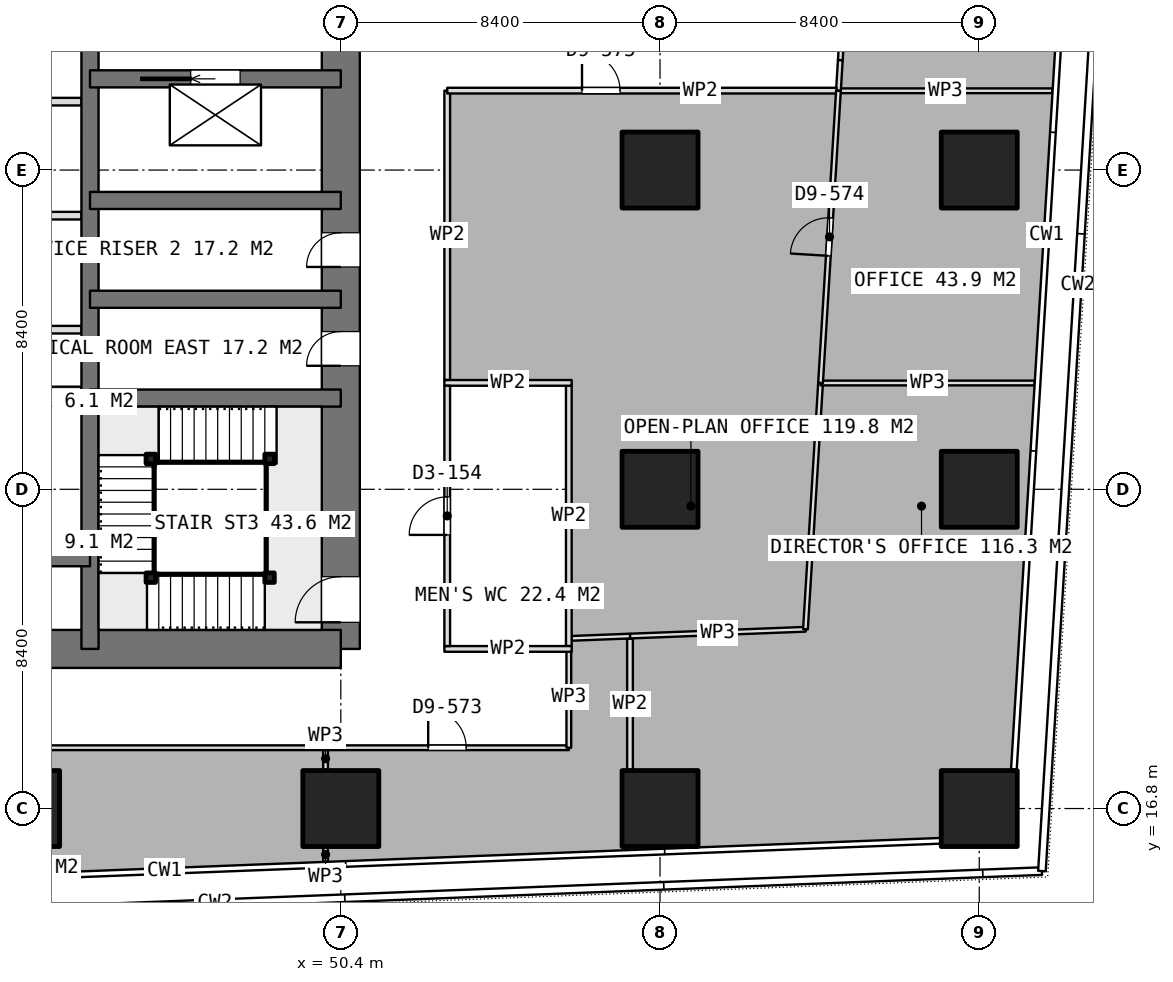
"""IFC4 building model, lengths in metres.
Left out: names, types, materials, properties, quantities, classifications, styles, units other than length and angle.
Written with IfcOpenShell. Run it as: python <this file> out.ifc"""

import sys

from ifc_helpers import new_model, si_unit, direction, frame, frame_2d, origin, origin_2d, place, context, subcontext, project, spatial, rectangle, extrude, element, fill, save


model = new_model("IFC4")
c1 = context("Model", 3, precision=1e-05, world=origin(), true_north=direction((0.0, 1.0)))
c2 = subcontext(c1, "Body", "Model", "MODEL_VIEW")
j1 = project(units=[si_unit("LENGTHUNIT", "METRE"), si_unit("PLANEANGLEUNIT", "RADIAN")], contexts=[c1])
p1 = place(None, origin())
s1 = spatial("IfcSite", under=j1, at=p1, CompositionType="ELEMENT")
p2 = place(p1, origin())
s2 = spatial("IfcBuilding", under=s1, at=p2, CompositionType="ELEMENT")
p3 = place(p2, frame((0.0, 0.0, 144.05)))
s3 = spatial("IfcBuildingStorey", under=s2, at=p3, CompositionType="ELEMENT", Elevation=144.05)
p4 = place(p3, frame((40.0, 21.0, 0.0), z_axis=(0.0, 0.0, 1.0), x_axis=(1.0, 0.0, 0.0)))
e1 = element("IfcWall", 1, at=p4, inside=s3, PredefinedType="SHEAR", context=c2, shape_type="SweptSolid", body=[
    extrude(rectangle(XDim=10.4, YDim=1.0, at=frame_2d((5.2, 0.0))), origin(), (0.0, 0.0, 1.0), 3.75),
])
p5 = place(p3, frame((50.4, 21.0, 0.0), z_axis=(0.0, 0.0, 1.0), x_axis=(0.0, 1.0, 0.0)))
e2 = element("IfcWall", 2, at=p5, inside=s3, PredefinedType="SHEAR", context=c2, shape_type="SweptSolid", body=[
    extrude(rectangle(XDim=25.2, YDim=1.0, at=frame_2d((12.6, 0.0))), origin(), (0.0, 0.0, 1.0), 3.75),
])
p6 = place(p5, frame((16.2, 0.0, 0.0)))
e3 = element("IfcOpeningElement", 3, at=p6, cuts=e2, PredefinedType="OPENING", context=c2, shape_type="SweptSolid", body=[
    extrude(rectangle(XDim=1.2, YDim=2.1, at=frame_2d((0.6, 1.05))), frame((0.0, 0.51, 0.0), z_axis=(0.0, -1.0, 0.0), x_axis=(1.0, 0.0, 0.0)), (0.0, 0.0, 1.0), 1.02),
])
p7 = place(p5, frame((10.05, 0.0, 0.0)))
e4 = element("IfcOpeningElement", 4, at=p7, cuts=e2, PredefinedType="OPENING", context=c2, shape_type="SweptSolid", body=[
    extrude(rectangle(XDim=0.9, YDim=2.1, at=frame_2d((0.45, 1.05))), frame((0.0, 0.51, 0.0), z_axis=(0.0, -1.0, 0.0), x_axis=(1.0, 0.0, 0.0)), (0.0, 0.0, 1.0), 1.02),
])
p8 = place(p5, frame((7.45, 0.0, 0.0)))
e5 = element("IfcOpeningElement", 5, at=p8, cuts=e2, PredefinedType="OPENING", context=c2, shape_type="SweptSolid", body=[
    extrude(rectangle(XDim=0.9, YDim=2.1, at=frame_2d((0.45, 1.05))), frame((0.0, 0.51, 0.0), z_axis=(0.0, -1.0, 0.0), x_axis=(1.0, 0.0, 0.0)), (0.0, 0.0, 1.0), 1.02),
])
p9 = place(p5, frame((0.7, 0.0, 0.0)))
e6 = element("IfcOpeningElement", 6, at=p9, cuts=e2, PredefinedType="OPENING", context=c2, shape_type="SweptSolid", body=[
    extrude(rectangle(XDim=1.2, YDim=2.1, at=frame_2d((0.6, 1.05))), frame((0.0, 0.51, 0.0), z_axis=(0.0, -1.0, 0.0), x_axis=(1.0, 0.0, 0.0)), (0.0, 0.0, 1.0), 1.02),
])
p10 = place(p3, frame((43.8, 21.0, 0.0), z_axis=(0.0, 0.0, 1.0), x_axis=(0.0, 1.0, 0.0)))
e7 = element("IfcWall", 7, at=p10, inside=s3, PredefinedType="SHEAR", context=c2, shape_type="SweptSolid", body=[
    extrude(rectangle(XDim=25.2, YDim=0.45, at=frame_2d((12.6, 0.0))), origin(), (0.0, 0.0, 1.0), 3.75),
])
p11 = place(p3, frame((40.0, 23.4, 0.0), z_axis=(0.0, 0.0, 1.0), x_axis=(1.0, 0.0, 0.0)))
e8 = element("IfcWall", 8, at=p11, inside=s3, PredefinedType="SHEAR", context=c2, shape_type="SweptSolid", body=[
    extrude(rectangle(XDim=3.8, YDim=0.45, at=frame_2d((1.9, 0.0))), origin(), (0.0, 0.0, 1.0), 3.75),
])
for number, where, z_axis, x_axis in (
    (9, (43.8, 27.6, 0.0), (0.0, 0.0, 1.0), (1.0, 0.0, 0.0)),
    (10, (43.8, 30.2, 0.0), (0.0, 0.0, 1.0), (1.0, 0.0, 0.0)),
    (11, (43.8, 32.8, 0.0), (0.0, 0.0, 1.0), (1.0, 0.0, 0.0)),
):
    element("IfcWall", number, at=place(p3, frame(where, z_axis=z_axis, x_axis=x_axis)), inside=s3, PredefinedType="SHEAR", context=c2, shape_type="SweptSolid", body=[
        extrude(rectangle(XDim=6.6, YDim=0.45, at=frame_2d((3.3, 0.0))), origin(), (0.0, 0.0, 1.0), 3.75),
    ])
p12 = place(p3, frame((43.8, 36.0, 0.0), z_axis=(0.0, 0.0, 1.0), x_axis=(1.0, 0.0, 0.0)))
e12 = element("IfcWall", 12, at=p12, inside=s3, PredefinedType="SHEAR", context=c2, shape_type="SweptSolid", body=[
    extrude(rectangle(XDim=6.6, YDim=0.45, at=frame_2d((3.3, 0.0))), origin(), (0.0, 0.0, 1.0), 3.75),
])
p13 = place(p12, frame((2.65, 0.0, 0.0)))
e13 = element("IfcOpeningElement", 13, at=p13, cuts=e12, PredefinedType="OPENING", context=c2, shape_type="SweptSolid", body=[
    extrude(rectangle(XDim=1.3, YDim=2.1, at=frame_2d((0.65, 1.05))), frame((0.0, 0.235, 0.0), z_axis=(0.0, -1.0, 0.0), x_axis=(1.0, 0.0, 0.0)), (0.0, 0.0, 1.0), 0.47),
])
for number, where, z_axis, x_axis in (
    (14, (42.0, 16.8, 0.0), (0.0, 0.0, 1.0), (1.0, 0.0, 0.0)),
    (15, (50.4, 16.8, 0.0), (0.0, 0.0, 1.0), (1.0, 0.0, 0.0)),
    (16, (58.8, 16.8, 0.0), (0.0, 0.0, 1.0), (1.0, 0.0, 0.0)),
    (17, (58.8, 25.2, 0.0), (0.0, 0.0, 1.0), (1.0, 0.0, 0.0)),
    (18, (58.8, 33.6, 0.0), (0.0, 0.0, 1.0), (1.0, 0.0, 0.0)),
    (19, (67.2, 16.8, 0.0), (0.0, 0.0, 1.0), (1.0, 0.0, 0.0)),
    (20, (67.2, 25.2, 0.0), (0.0, 0.0, 1.0), (1.0, 0.0, 0.0)),
    (21, (67.2, 33.6, 0.0), (0.0, 0.0, 1.0), (1.0, 0.0, 0.0)),
):
    element("IfcColumn", number, at=place(p3, frame(where, z_axis=z_axis, x_axis=x_axis)), inside=s3, PredefinedType="COLUMN", context=c2, shape_type="SweptSolid", body=[
        extrude(rectangle(XDim=2.0, YDim=2.0, at=origin_2d()), origin(), (0.0, 0.0, 1.0), 3.75),
    ])
for number, where, z_axis, x_axis in (
    (22, (40.225, 29.4, 0.0), (0.0, 0.0, 1.0), (1.0, 0.0, 0.0)),
    (23, (40.225, 32.4, 0.0), (0.0, 0.0, 1.0), (1.0, 0.0, 0.0)),
    (24, (40.225, 35.4, 0.0), (0.0, 0.0, 1.0), (1.0, 0.0, 0.0)),
    (25, (40.225, 27.8, 0.0), (0.0, 0.0, 1.0), (1.0, 0.0, 0.0)),
):
    element("IfcWall", number, at=place(p3, frame(where, z_axis=z_axis, x_axis=x_axis)), inside=s3, PredefinedType="PARTITIONING", context=c2, shape_type="SweptSolid", body=[
        extrude(rectangle(XDim=3.35, YDim=0.2, at=frame_2d((1.675, 0.0))), origin(), (0.0, 0.0, 1.0), 3.5),
    ])
for number, where, z_axis, x_axis in (
    (26, (53.125, 21.0, 0.0), (0.0, 0.0, 1.0), (1.0, 0.0, 0.0)),
    (27, (53.125, 28.0, 0.0), (0.0, 0.0, 1.0), (1.0, 0.0, 0.0)),
):
    element("IfcWall", number, at=place(p3, frame(where, z_axis=z_axis, x_axis=x_axis)), inside=s3, PredefinedType="PARTITIONING", context=c2, shape_type="SweptSolid", body=[
        extrude(rectangle(XDim=3.35, YDim=0.15, at=frame_2d((1.675, 0.0))), origin(), (0.0, 0.0, 1.0), 3.5),
    ])
p14 = place(p3, frame((53.2, 21.075, 0.0), z_axis=(0.0, 0.0, 1.0), x_axis=(0.0, 1.0, 0.0)))
e28 = element("IfcWall", 28, at=p14, inside=s3, PredefinedType="PARTITIONING", context=c2, shape_type="SweptSolid", body=[
    extrude(rectangle(XDim=6.85, YDim=0.15, at=frame_2d((3.425, 0.0))), origin(), (0.0, 0.0, 1.0), 3.5),
])
p15 = place(p14, frame((2.925, 0.0, 0.0)))
e29 = element("IfcOpeningElement", 29, at=p15, cuts=e28, PredefinedType="OPENING", context=c2, shape_type="SweptSolid", body=[
    extrude(rectangle(XDim=1.0, YDim=2.1, at=frame_2d((0.5, 1.05))), frame((0.0, 0.085, 0.0), z_axis=(0.0, -1.0, 0.0), x_axis=(1.0, 0.0, 0.0)), (0.0, 0.0, 1.0), 0.17),
])
p16 = place(p3, frame((56.4, 21.075, 0.0), z_axis=(0.0, 0.0, 1.0), x_axis=(0.0, 1.0, 0.0)))
e30 = element("IfcWall", 30, at=p16, inside=s3, PredefinedType="PARTITIONING", context=c2, shape_type="SweptSolid", body=[
    extrude(rectangle(XDim=6.85, YDim=0.15, at=frame_2d((3.425, 0.0))), origin(), (0.0, 0.0, 1.0), 3.5),
])
p17 = place(p3, frame((49.999, 15.401, 0.0), z_axis=(0.0, 0.0, 1.0), x_axis=(0.0, 1.0, 0.0)))
e31 = element("IfcWall", 31, at=p17, inside=s3, PredefinedType="PARTITIONING", context=c2, shape_type="SweptSolid", body=[
    extrude(rectangle(XDim=0.379, YDim=0.125, at=frame_2d((0.189, 0.0))), origin(), (0.0, 0.0, 1.0), 3.5),
])
p18 = place(p3, frame((49.999, 17.82, 0.0), z_axis=(0.0, 0.0, 1.0), x_axis=(0.0, 1.0, 0.0)))
e32 = element("IfcWall", 32, at=p18, inside=s3, PredefinedType="PARTITIONING", context=c2, shape_type="SweptSolid", body=[
    extrude(rectangle(XDim=0.58, YDim=0.125, at=frame_2d((0.29, 0.0))), origin(), (0.0, 0.0, 1.0), 3.5),
])
p19 = place(p3, frame((49.999, 18.4, 0.0), z_axis=(0.0, 0.0, 1.0), x_axis=(1.0, 0.0, 0.0)))
e33 = element("IfcWall", 33, at=p19, inside=s3, PredefinedType="PARTITIONING", context=c2, shape_type="SweptSolid", body=[
    extrude(rectangle(XDim=6.401, YDim=0.125, at=frame_2d((3.2, 0.0))), origin(), (0.0, 0.0, 1.0), 3.5),
])
p20 = place(p19, frame((2.7, 0.0, 0.0)))
e34 = element("IfcOpeningElement", 34, at=p20, cuts=e33, PredefinedType="OPENING", context=c2, shape_type="SweptSolid", body=[
    extrude(rectangle(XDim=1.0, YDim=2.1, at=frame_2d((0.5, 1.05))), frame((0.0, 0.073, 0.0), z_axis=(0.0, -1.0, 0.0), x_axis=(1.0, 0.0, 0.0)), (0.0, 0.0, 1.0), 0.145),
])
p21 = place(p3, frame((56.4, 18.4, 0.0), z_axis=(0.0, 0.0, 1.0), x_axis=(0.0, 1.0, 0.0)))
e35 = element("IfcWall", 35, at=p21, inside=s3, PredefinedType="PARTITIONING", context=c2, shape_type="SweptSolid", body=[
    extrude(rectangle(XDim=2.674, YDim=0.125, at=frame_2d((1.337, 0.0))), origin(), (0.0, 0.0, 1.0), 3.5),
])
p22 = place(p3, frame((56.475, 21.278, 0.0), z_axis=(0.0, 0.0, 1.0), x_axis=(0.999243484795, 0.038890334198, 0.0)))
e36 = element("IfcWall", 36, at=p22, inside=s3, PredefinedType="PARTITIONING", context=c2, shape_type="SweptSolid", body=[
    extrude(rectangle(XDim=1.538, YDim=0.125, at=frame_2d((0.769, 0.0))), origin(), (0.0, 0.0, 1.0), 3.5),
])
p23 = place(p3, frame((58.012, 21.338, 0.0), z_axis=(0.0, 0.0, 1.0), x_axis=(0.999246974146, 0.038800575518, 0.0)))
e37 = element("IfcWall", 37, at=p23, inside=s3, PredefinedType="PARTITIONING", context=c2, shape_type="SweptSolid", body=[
    extrude(rectangle(XDim=4.618, YDim=0.125, at=frame_2d((2.309, 0.0))), origin(), (0.0, 0.0, 1.0), 3.5),
])
p24 = place(p3, frame((62.627, 21.517, 0.0), z_axis=(0.0, 0.0, 1.0), x_axis=(0.061146763842, 0.998128785915, 0.0)))
e38 = element("IfcWall", 38, at=p24, inside=s3, PredefinedType="PARTITIONING", context=c2, shape_type="SweptSolid", body=[
    extrude(rectangle(XDim=6.492, YDim=0.125, at=frame_2d((3.246, 0.0))), origin(), (0.0, 0.0, 1.0), 3.5),
])
p25 = place(p3, frame((63.024, 27.997, 0.0), z_axis=(0.0, 0.0, 1.0), x_axis=(1.0, 0.0, 0.0)))
e39 = element("IfcWall", 39, at=p25, inside=s3, PredefinedType="PARTITIONING", context=c2, shape_type="SweptSolid", body=[
    extrude(rectangle(XDim=5.631, YDim=0.125, at=frame_2d((2.815, 0.0))), origin(), (0.0, 0.0, 1.0), 3.5),
])
p26 = place(p3, frame((63.024, 27.998, 0.0), z_axis=(0.0, 0.0, 1.0), x_axis=(0.061174508596, 0.998127085845, 0.0)))
e40 = element("IfcWall", 40, at=p26, inside=s3, PredefinedType="PARTITIONING", context=c2, shape_type="SweptSolid", body=[
    extrude(rectangle(XDim=7.702, YDim=0.125, at=frame_2d((3.851, 0.0))), origin(), (0.0, 0.0, 1.0), 3.5),
])
p27 = place(p26, frame((3.351, 0.0, 0.0)))
e41 = element("IfcOpeningElement", 41, at=p27, cuts=e40, PredefinedType="OPENING", context=c2, shape_type="SweptSolid", body=[
    extrude(rectangle(XDim=1.0, YDim=2.1, at=frame_2d((0.5, 1.05))), frame((0.0, 0.073, 0.0), z_axis=(0.0, -1.0, 0.0), x_axis=(1.0, 0.0, 0.0)), (0.0, 0.0, 1.0), 0.145),
])
p28 = place(p3, frame((63.495, 35.686, 0.0), z_axis=(0.0, 0.0, 1.0), x_axis=(1.0, 0.0, 0.0)))
e42 = element("IfcWall", 42, at=p28, inside=s3, PredefinedType="PARTITIONING", context=c2, shape_type="SweptSolid", body=[
    extrude(rectangle(XDim=5.631, YDim=0.125, at=frame_2d((2.815, 0.0))), origin(), (0.0, 0.0, 1.0), 3.5),
])
p29 = place(p3, frame((63.544, 36.491, 0.0), z_axis=(0.0, 0.0, 1.0), x_axis=(0.061169286548, 0.998127405887, 0.0)))
e43 = element("IfcWall", 43, at=p29, inside=s3, PredefinedType="PARTITIONING", context=c2, shape_type="SweptSolid", body=[
    extrude(rectangle(XDim=9.303, YDim=0.125, at=frame_2d((4.652, 0.0))), origin(), (0.0, 0.0, 1.0), 3.5),
])
p30 = place(p29, frame((4.152, 0.0, 0.0)))
e44 = element("IfcOpeningElement", 44, at=p30, cuts=e43, PredefinedType="OPENING", context=c2, shape_type="SweptSolid", body=[
    extrude(rectangle(XDim=1.0, YDim=2.1, at=frame_2d((0.5, 1.05))), frame((0.0, 0.073, 0.0), z_axis=(0.0, -1.0, 0.0), x_axis=(1.0, 0.0, 0.0)), (0.0, 0.0, 1.0), 0.145),
])
p31 = place(p3, frame((63.495, 35.687, 0.0), z_axis=(0.0, 0.0, 1.0), x_axis=(0.060623183924, 0.998160723316, 0.0)))
e45 = element("IfcWall", 45, at=p31, inside=s3, PredefinedType="PARTITIONING", context=c2, shape_type="SweptSolid", body=[
    extrude(rectangle(XDim=0.805, YDim=0.125, at=frame_2d((0.403, 0.0))), origin(), (0.0, 0.0, 1.0), 3.5),
])
p32 = place(p3, frame((58.01, 17.82, 0.0), z_axis=(0.0, 0.0, 1.0), x_axis=(0.0, 1.0, 0.0)))
e46 = element("IfcWall", 46, at=p32, inside=s3, PredefinedType="PARTITIONING", context=c2, shape_type="SweptSolid", body=[
    extrude(rectangle(XDim=3.455, YDim=0.15, at=frame_2d((1.728, 0.0))), origin(), (0.0, 0.0, 1.0), 3.5),
])
p33 = place(p3, frame((53.2, 28.075, 0.0), z_axis=(0.0, 0.0, 1.0), x_axis=(0.0, 1.0, 0.0)))
e47 = element("IfcWall", 47, at=p33, inside=s3, PredefinedType="PARTITIONING", context=c2, shape_type="SweptSolid", body=[
    extrude(rectangle(XDim=7.615, YDim=0.15, at=frame_2d((3.808, 0.0))), origin(), (0.0, 0.0, 1.0), 3.5),
])
p34 = place(p3, frame((53.2, 35.69, 0.0), z_axis=(0.0, 0.0, 1.0), x_axis=(1.0, 0.0, 0.0)))
e48 = element("IfcWall", 48, at=p34, inside=s3, PredefinedType="PARTITIONING", context=c2, shape_type="SweptSolid", body=[
    extrude(rectangle(XDim=10.246, YDim=0.15, at=frame_2d((5.123, 0.0))), origin(), (0.0, 0.0, 1.0), 3.5),
])
p35 = place(p34, frame((3.547, 0.0, 0.0)))
e49 = element("IfcOpeningElement", 49, at=p35, cuts=e48, PredefinedType="OPENING", context=c2, shape_type="SweptSolid", body=[
    extrude(rectangle(XDim=1.0, YDim=2.1, at=frame_2d((0.5, 1.05))), frame((0.0, 0.085, 0.0), z_axis=(0.0, -1.0, 0.0), x_axis=(1.0, 0.0, 0.0)), (0.0, 0.0, 1.0), 0.17),
])
p36 = place(p3, frame((33.513, 18.4, 0.0), z_axis=(0.0, 0.0, 1.0), x_axis=(1.0, 0.0, 0.0)))
e50 = element("IfcWall", 50, at=p36, inside=s3, PredefinedType="PARTITIONING", context=c2, shape_type="SweptSolid", body=[
    extrude(rectangle(XDim=16.485, YDim=0.125, at=frame_2d((8.243, 0.0))), origin(), (0.0, 0.0, 1.0), 3.5),
])
p37 = place(p36, frame((5.543, 0.0, 0.0)))
e51 = element("IfcOpeningElement", 51, at=p37, cuts=e50, PredefinedType="OPENING", context=c2, shape_type="SweptSolid", body=[
    extrude(rectangle(XDim=1.8, YDim=2.1, at=frame_2d((0.9, 1.05))), frame((0.0, 0.073, 0.0), z_axis=(0.0, -1.0, 0.0), x_axis=(1.0, 0.0, 0.0)), (0.0, 0.0, 1.0), 0.145),
])
for number, where, z_axis, x_axis in (
    (52, (48.525, 22.875, 0.0), (0.0, 0.0, 1.0), (1.0, 0.0, 0.0)),
    (53, (45.4, 22.875, 0.0), (0.0, 0.0, 1.0), (1.0, 0.0, 0.0)),
    (54, (45.4, 26.0, 0.0), (0.0, 0.0, 1.0), (1.0, 0.0, 0.0)),
    (55, (48.525, 26.0, 0.0), (0.0, 0.0, 1.0), (1.0, 0.0, 0.0)),
):
    element("IfcColumn", number, at=place(p3, frame(where, z_axis=z_axis, x_axis=x_axis)), inside=s3, PredefinedType="COLUMN", context=c2, shape_type="SweptSolid", body=[
        extrude(rectangle(XDim=0.25, YDim=0.25, at=origin_2d()), origin(), (0.0, 0.0, 1.0), 3.75),
    ])
p38 = place(p7, origin())
e56 = element("IfcDoor", 56, at=p38, inside=s3, OperationType="SINGLE_SWING_LEFT", PredefinedType="DOOR", context=c2, shape_type="SweptSolid", body=[
    extrude(rectangle(XDim=0.9, YDim=2.1, at=frame_2d((0.45, 1.05))), frame((0.0, 0.025, 0.0), z_axis=(0.0, -1.0, 0.0), x_axis=(1.0, 0.0, 0.0)), (0.0, 0.0, 1.0), 0.05),
])
fill(e4, e56)
p39 = place(p8, origin())
e57 = element("IfcDoor", 57, at=p39, inside=s3, OperationType="SINGLE_SWING_LEFT", PredefinedType="DOOR", context=c2, shape_type="SweptSolid", body=[
    extrude(rectangle(XDim=0.9, YDim=2.1, at=frame_2d((0.45, 1.05))), frame((0.0, 0.025, 0.0), z_axis=(0.0, -1.0, 0.0), x_axis=(1.0, 0.0, 0.0)), (0.0, 0.0, 1.0), 0.05),
])
fill(e5, e57)
p40 = place(p13, origin())
e58 = element("IfcDoor", 58, at=p40, inside=s3, OperationType="SLIDING_TO_LEFT", PredefinedType="USERDEFINED", context=c2, shape_type="SweptSolid", body=[
    extrude(rectangle(XDim=1.3, YDim=2.1, at=frame_2d((0.65, 1.05))), frame((0.0, 0.025, 0.0), z_axis=(0.0, -1.0, 0.0), x_axis=(1.0, 0.0, 0.0)), (0.0, 0.0, 1.0), 0.05),
])
fill(e13, e58)
p41 = place(p15, origin())
e59 = element("IfcDoor", 59, at=p41, inside=s3, OperationType="SINGLE_SWING_LEFT", PredefinedType="DOOR", context=c2, shape_type="SweptSolid", body=[
    extrude(rectangle(XDim=1.0, YDim=2.1, at=frame_2d((0.5, 1.05))), frame((0.0, 0.025, 0.0), z_axis=(0.0, -1.0, 0.0), x_axis=(1.0, 0.0, 0.0)), (0.0, 0.0, 1.0), 0.05),
])
fill(e29, e59)
p42 = place(p20, origin())
e60 = element("IfcDoor", 60, at=p42, inside=s3, OperationType="SINGLE_SWING_LEFT", PredefinedType="DOOR", context=c2, shape_type="SweptSolid", body=[
    extrude(rectangle(XDim=1.0, YDim=2.1, at=frame_2d((0.5, 1.05))), frame((0.0, 0.025, 0.0), z_axis=(0.0, -1.0, 0.0), x_axis=(1.0, 0.0, 0.0)), (0.0, 0.0, 1.0), 0.05),
])
fill(e34, e60)
p43 = place(p27, origin())
e61 = element("IfcDoor", 61, at=p43, inside=s3, OperationType="SINGLE_SWING_LEFT", PredefinedType="DOOR", context=c2, shape_type="SweptSolid", body=[
    extrude(rectangle(XDim=1.0, YDim=2.1, at=frame_2d((0.5, 1.05))), frame((0.0, 0.025, 0.0), z_axis=(0.0, -1.0, 0.0), x_axis=(1.0, 0.0, 0.0)), (0.0, 0.0, 1.0), 0.05),
])
fill(e41, e61)
p44 = place(p35, origin())
e62 = element("IfcDoor", 62, at=p44, inside=s3, OperationType="SINGLE_SWING_LEFT", PredefinedType="DOOR", context=c2, shape_type="SweptSolid", body=[
    extrude(rectangle(XDim=1.0, YDim=2.1, at=frame_2d((0.5, 1.05))), frame((0.0, 0.025, 0.0), z_axis=(0.0, -1.0, 0.0), x_axis=(1.0, 0.0, 0.0)), (0.0, 0.0, 1.0), 0.05),
])
fill(e49, e62)
p45 = place(p9, origin())
e63 = element("IfcDoor", 63, at=p45, inside=s3, OperationType="SINGLE_SWING_RIGHT", PredefinedType="DOOR", context=c2, shape_type="SweptSolid", body=[
    extrude(rectangle(XDim=1.2, YDim=2.1, at=frame_2d((0.6, 1.05))), frame((0.0, 0.025, 0.0), z_axis=(0.0, -1.0, 0.0), x_axis=(1.0, 0.0, 0.0)), (0.0, 0.0, 1.0), 0.05),
])
fill(e6, e63)
save(model, sys.argv[1])
